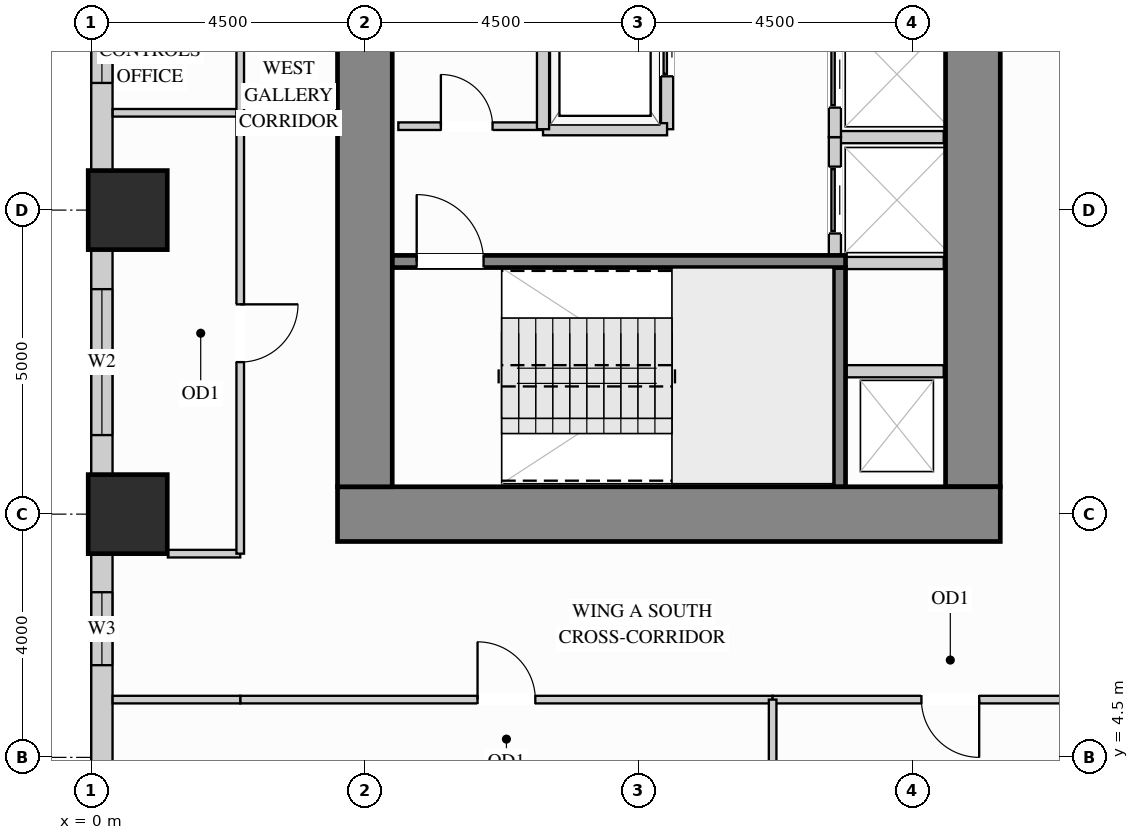
"""IFC4 building model, lengths in metres.
Left out: names, types, materials, properties, quantities, classifications, styles, units other than length and angle.
Written with IfcOpenShell. Run it as: python <this file> out.ifc"""

import sys

from ifc_helpers import new_model, si_unit, direction, frame, frame_2d, origin, origin_2d, place, context, subcontext, project, spatial, rectangle, extrude, source, transform, mapped, element, fill, save


model = new_model("IFC4")
c1 = context("Model", 3, precision=1e-05, world=origin(), true_north=direction((0.0, 1.0)))
c2 = subcontext(c1, "Body", "Model", "MODEL_VIEW")
j1 = project(units=[si_unit("LENGTHUNIT", "METRE"), si_unit("PLANEANGLEUNIT", "RADIAN")], contexts=[c1])
p1 = place(None, origin())
s1 = spatial("IfcSite", under=j1, at=p1, CompositionType="ELEMENT")
p2 = place(p1, origin())
s2 = spatial("IfcBuilding", under=s1, at=p2, CompositionType="ELEMENT")
p3 = place(p2, frame((0.0, 0.0, 26.1)))
s3 = spatial("IfcBuildingStorey", under=s2, at=p3, CompositionType="ELEMENT", Elevation=26.1)
m1 = source(origin(), c2, "Body", "SweptSolid", [
    extrude(rectangle(XDim=1.3, YDim=1.3, at=origin_2d()), origin(), (0.0, 0.0, 1.0), 3.38),
])
for number, where, z_axis, x_axis in (
    (1, (0.6, 13.5, 0.0), (0.0, 0.0, 1.0), (1.0, 0.0, 0.0)),
    (2, (0.6, 8.5, 0.0), (0.0, 0.0, 1.0), (1.0, 0.0, 0.0)),
):
    element("IfcColumn", number, at=place(p3, frame(where, z_axis=z_axis, x_axis=x_axis)), inside=s3, PredefinedType="COLUMN", context=c2, shape_type="MappedRepresentation", body=[
        mapped(m1, transform((0.0, 0.0, 0.0), x_axis=(1.0, 0.0, 0.0), y_axis=(0.0, 1.0, 0.0), z_axis=(0.0, 0.0, 1.0))),
    ])
m2 = source(origin(), c2, "Body", "SweptSolid", [
    extrude(rectangle(XDim=9.87, YDim=0.9, at=frame_2d((4.935, 0.0))), origin(), (0.0, 0.0, 1.0), 3.38),
])
p4 = place(p3, frame((14.5, 8.95, 0.0), z_axis=(0.0, 0.0, 1.0), x_axis=(0.0, 1.0, 0.0)))
e3 = element("IfcWall", 3, at=p4, inside=s3, PredefinedType="SHEAR", context=c2, shape_type="MappedRepresentation", body=[
    mapped(m2, transform((0.0, 0.0, 0.0), x_axis=(1.0, 0.0, 0.0), y_axis=(0.0, 1.0, 0.0), z_axis=(0.0, 0.0, 1.0))),
])
m3 = source(origin(), c2, "Body", "SweptSolid", [
    extrude(rectangle(XDim=10.9, YDim=0.9, at=frame_2d((5.45, 0.0))), origin(), (0.0, 0.0, 1.0), 3.38),
])
p5 = place(p3, frame((4.05, 8.5, 0.0), z_axis=(0.0, 0.0, 1.0), x_axis=(1.0, 0.0, 0.0)))
e4 = element("IfcWall", 4, at=p5, inside=s3, PredefinedType="SHEAR", context=c2, shape_type="MappedRepresentation", body=[
    mapped(m3, transform((0.0, 0.0, 0.0), x_axis=(1.0, 0.0, 0.0), y_axis=(0.0, 1.0, 0.0), z_axis=(0.0, 0.0, 1.0))),
])
m4 = source(origin(), c2, "Body", "SweptSolid", [
    extrude(rectangle(XDim=20.1, YDim=0.9, at=frame_2d((10.05, 0.0))), origin(), (0.0, 0.0, 1.0), 3.38),
])
p6 = place(p3, frame((4.5, 8.95, 0.0), z_axis=(0.0, 0.0, 1.0), x_axis=(0.0, 1.0, 0.0)))
e5 = element("IfcWall", 5, at=p6, inside=s3, PredefinedType="SHEAR", context=c2, shape_type="MappedRepresentation", body=[
    mapped(m4, transform((0.0, 0.0, 0.0), x_axis=(1.0, 0.0, 0.0), y_axis=(0.0, 1.0, 0.0), z_axis=(0.0, 0.0, 1.0))),
])
p7 = place(p3, frame((0.175, 17.352, 0.0), z_axis=(0.0, 0.0, 1.0), x_axis=(0.0, -1.0, 0.0)))
e6 = element("IfcWall", 6, at=p7, inside=s3, PredefinedType="SOLIDWALL", context=c2, shape_type="SweptSolid", body=[
    extrude(rectangle(XDim=3.204, YDim=0.35, at=frame_2d((1.602, 0.0))), origin(), (0.0, 0.0, 1.0), 2.51),
])
p8 = place(p7, frame((0.561, 0.0, 0.78)))
e7 = element("IfcOpeningElement", 7, at=p8, cuts=e6, PredefinedType="OPENING", context=c2, shape_type="SweptSolid", body=[
    extrude(rectangle(XDim=1.2, YDim=1.55, at=frame_2d((0.6, 0.775))), frame((0.0, 0.185, 0.0), z_axis=(0.0, -1.0, 0.0), x_axis=(1.0, 0.0, 0.0)), (0.0, 0.0, 1.0), 0.37),
])
p9 = place(p3, frame((0.175, 12.852, 0.0), z_axis=(0.0, 0.0, 1.0), x_axis=(0.0, -1.0, 0.0)))
e8 = element("IfcWall", 8, at=p9, inside=s3, PredefinedType="SOLIDWALL", context=c2, shape_type="SweptSolid", body=[
    extrude(rectangle(XDim=3.704, YDim=0.35, at=frame_2d((1.852, 0.0))), origin(), (0.0, 0.0, 1.0), 2.51),
])
p10 = place(p9, frame((0.652, 0.0, 0.78)))
e9 = element("IfcOpeningElement", 9, at=p10, cuts=e8, PredefinedType="OPENING", context=c2, shape_type="SweptSolid", body=[
    extrude(rectangle(XDim=2.4, YDim=1.55, at=frame_2d((1.2, 0.775))), frame((0.0, 0.185, 0.0), z_axis=(0.0, -1.0, 0.0), x_axis=(1.0, 0.0, 0.0)), (0.0, 0.0, 1.0), 0.37),
])
p11 = place(p3, frame((0.175, 7.852, 0.0), z_axis=(0.0, 0.0, 1.0), x_axis=(0.0, -1.0, 0.0)))
e10 = element("IfcWall", 10, at=p11, inside=s3, PredefinedType="SOLIDWALL", context=c2, shape_type="SweptSolid", body=[
    extrude(rectangle(XDim=3.704, YDim=0.35, at=frame_2d((1.852, 0.0))), origin(), (0.0, 0.0, 1.0), 2.51),
])
p12 = place(p11, frame((0.636, 0.0, 0.78)))
e11 = element("IfcOpeningElement", 11, at=p12, cuts=e10, PredefinedType="OPENING", context=c2, shape_type="SweptSolid", body=[
    extrude(rectangle(XDim=1.2, YDim=1.55, at=frame_2d((0.6, 0.775))), frame((0.0, 0.185, 0.0), z_axis=(0.0, -1.0, 0.0), x_axis=(1.0, 0.0, 0.0)), (0.0, 0.0, 1.0), 0.37),
])
p13 = place(p3, frame((5.05, 14.88, 0.0), z_axis=(0.0, 0.0, 1.0), x_axis=(1.0, 0.0, 0.0)))
e12 = element("IfcWall", 12, at=p13, inside=s3, PredefinedType="PARTITIONING", context=c2, shape_type="SweptSolid", body=[
    extrude(rectangle(XDim=2.35, YDim=0.125, at=frame_2d((1.175, 0.0))), origin(), (0.0, 0.0, 1.0), 3.365),
])
p14 = place(p13, frame((0.7, 0.0, 0.0)))
e13 = element("IfcOpeningElement", 13, at=p14, cuts=e12, PredefinedType="OPENING", context=c2, shape_type="SweptSolid", body=[
    extrude(rectangle(XDim=0.85, YDim=2.1, at=frame_2d((0.425, 1.05))), frame((0.0, 0.073, 0.0), z_axis=(0.0, -1.0, 0.0), x_axis=(1.0, 0.0, 0.0)), (0.0, 0.0, 1.0), 0.145),
])
m5 = source(origin(), c2, "Body", "SweptSolid", [
    extrude(rectangle(XDim=1.19, YDim=0.125, at=frame_2d((0.595, 0.0))), origin(), (0.0, 0.0, 1.0), 3.365),
])
p15 = place(p3, frame((1.26, 7.85, 0.0), z_axis=(0.0, 0.0, 1.0), x_axis=(1.0, 0.0, 0.0)))
e14 = element("IfcWall", 14, at=p15, inside=s3, PredefinedType="PARTITIONING", context=c2, shape_type="MappedRepresentation", body=[
    mapped(m5, transform((0.0, 0.0, 0.0), x_axis=(1.0, 0.0, 0.0), y_axis=(0.0, 1.0, 0.0), z_axis=(0.0, 0.0, 1.0))),
])
p16 = place(p3, frame((2.45, 5.45, 0.0), z_axis=(0.0, 0.0, 1.0), x_axis=(1.0, 0.0, 0.0)))
e15 = element("IfcWall", 15, at=p16, inside=s3, PredefinedType="PARTITIONING", context=c2, shape_type="SweptSolid", body=[
    extrude(rectangle(XDim=8.756, YDim=0.125, at=frame_2d((4.378, 0.0))), origin(), (0.0, 0.0, 1.0), 3.365),
])
p17 = place(p16, frame((3.903, 0.0, 0.0)))
e16 = element("IfcOpeningElement", 16, at=p17, cuts=e15, PredefinedType="OPENING", context=c2, shape_type="SweptSolid", body=[
    extrude(rectangle(XDim=0.95, YDim=2.15, at=frame_2d((0.475, 1.075))), frame((0.0, 0.073, 0.0), z_axis=(0.0, -1.0, 0.0), x_axis=(1.0, 0.0, 0.0)), (0.0, 0.0, 1.0), 0.145),
])
p18 = place(p3, frame((11.206, 5.45, 0.0), z_axis=(0.0, 0.0, 1.0), x_axis=(1.0, 0.0, 0.0)))
e17 = element("IfcWall", 17, at=p18, inside=s3, PredefinedType="PARTITIONING", context=c2, shape_type="SweptSolid", body=[
    extrude(rectangle(XDim=5.844, YDim=0.125, at=frame_2d((2.922, 0.0))), origin(), (0.0, 0.0, 1.0), 3.365),
])
p19 = place(p18, frame((2.447, 0.0, 0.0)))
e18 = element("IfcOpeningElement", 18, at=p19, cuts=e17, PredefinedType="OPENING", context=c2, shape_type="SweptSolid", body=[
    extrude(rectangle(XDim=0.95, YDim=2.15, at=frame_2d((0.475, 1.075))), frame((0.0, 0.073, 0.0), z_axis=(0.0, -1.0, 0.0), x_axis=(1.0, 0.0, 0.0)), (0.0, 0.0, 1.0), 0.145),
])
m6 = source(origin(), c2, "Body", "SweptSolid", [
    extrude(rectangle(XDim=2.098, YDim=0.125, at=frame_2d((1.049, 0.0))), origin(), (0.0, 0.0, 1.0), 3.365),
])
p20 = place(p3, frame((0.352, 5.45, 0.0), z_axis=(0.0, 0.0, 1.0), x_axis=(1.0, 0.0, 0.0)))
e19 = element("IfcWall", 19, at=p20, inside=s3, PredefinedType="PARTITIONING", context=c2, shape_type="MappedRepresentation", body=[
    mapped(m6, transform((0.0, 0.0, 0.0), x_axis=(1.0, 0.0, 0.0), y_axis=(0.0, 1.0, 0.0), z_axis=(0.0, 0.0, 1.0))),
])
m7 = source(origin(), c2, "Body", "SweptSolid", [
    extrude(rectangle(XDim=5.098, YDim=0.125, at=frame_2d((2.549, 0.0))), origin(), (0.0, 0.0, 1.0), 3.365),
])
p21 = place(p3, frame((11.206, 0.352, 0.0), z_axis=(0.0, 0.0, 1.0), x_axis=(0.0, 1.0, 0.0)))
e20 = element("IfcWall", 20, at=p21, inside=s3, PredefinedType="PARTITIONING", context=c2, shape_type="MappedRepresentation", body=[
    mapped(m7, transform((0.0, 0.0, 0.0), x_axis=(1.0, 0.0, 0.0), y_axis=(0.0, 1.0, 0.0), z_axis=(0.0, 0.0, 1.0))),
])
p22 = place(p3, frame((0.352, 15.1, 0.0), z_axis=(0.0, 0.0, 1.0), x_axis=(1.0, 0.0, 0.0)))
e21 = element("IfcWall", 21, at=p22, inside=s3, PredefinedType="PARTITIONING", context=c2, shape_type="MappedRepresentation", body=[
    mapped(m6, transform((0.0, 0.0, 0.0), x_axis=(1.0, 0.0, 0.0), y_axis=(0.0, 1.0, 0.0), z_axis=(0.0, 0.0, 1.0))),
])
p23 = place(p3, frame((2.45, 7.85, 0.0), z_axis=(0.0, 0.0, 1.0), x_axis=(0.0, 1.0, 0.0)))
e22 = element("IfcWall", 22, at=p23, inside=s3, PredefinedType="PARTITIONING", context=c2, shape_type="SweptSolid", body=[
    extrude(rectangle(XDim=7.25, YDim=0.125, at=frame_2d((3.625, 0.0))), origin(), (0.0, 0.0, 1.0), 3.365),
])
p24 = place(p23, frame((3.15, 0.0, 0.0)))
e23 = element("IfcOpeningElement", 23, at=p24, cuts=e22, PredefinedType="OPENING", context=c2, shape_type="SweptSolid", body=[
    extrude(rectangle(XDim=0.95, YDim=2.15, at=frame_2d((0.475, 1.075))), frame((0.0, 0.073, 0.0), z_axis=(0.0, -1.0, 0.0), x_axis=(1.0, 0.0, 0.0)), (0.0, 0.0, 1.0), 0.145),
])
p25 = place(p3, frame((2.45, 15.1, 0.0), z_axis=(0.0, 0.0, 1.0), x_axis=(0.0, 1.0, 0.0)))
e24 = element("IfcWall", 24, at=p25, inside=s3, PredefinedType="PARTITIONING", context=c2, shape_type="SweptSolid", body=[
    extrude(rectangle(XDim=7.5, YDim=0.125, at=frame_2d((3.75, 0.0))), origin(), (0.0, 0.0, 1.0), 3.365),
])
p26 = place(p25, frame((4.1, 0.0, 0.0)))
e25 = element("IfcOpeningElement", 25, at=p26, cuts=e24, PredefinedType="OPENING", context=c2, shape_type="SweptSolid", body=[
    extrude(rectangle(XDim=0.95, YDim=2.15, at=frame_2d((0.475, 1.075))), frame((0.0, 0.073, 0.0), z_axis=(0.0, -1.0, 0.0), x_axis=(1.0, 0.0, 0.0)), (0.0, 0.0, 1.0), 0.145),
])
m8 = source(origin(), c2, "Body", "SweptSolid", [
    extrude(rectangle(XDim=1.6, YDim=0.2, at=frame_2d((0.8, 0.0))), origin(), (0.0, 0.0, 1.0), 3.365),
])
p27 = place(p3, frame((12.42, 10.85, 0.0), z_axis=(0.0, 0.0, 1.0), x_axis=(1.0, 0.0, 0.0)))
e26 = element("IfcWall", 26, at=p27, inside=s3, PredefinedType="PARTITIONING", context=c2, shape_type="MappedRepresentation", body=[
    mapped(m8, transform((0.0, 0.0, 0.0), x_axis=(1.0, 0.0, 0.0), y_axis=(0.0, 1.0, 0.0), z_axis=(0.0, 0.0, 1.0))),
])
m9 = source(origin(), c2, "Body", "SweptSolid", [
    extrude(rectangle(XDim=1.79, YDim=0.2, at=frame_2d((0.895, 0.0))), origin(), (0.0, 0.0, 1.0), 3.365),
])
for number, where, z_axis, x_axis in (
    (27, (12.23, 14.7, 0.0), (0.0, 0.0, 1.0), (1.0, 0.0, 0.0)),
    (28, (12.23, 12.63, 0.0), (0.0, 0.0, 1.0), (1.0, 0.0, 0.0)),
):
    element("IfcWall", number, at=place(p3, frame(where, z_axis=z_axis, x_axis=x_axis)), inside=s3, PredefinedType="PARTITIONING", context=c2, shape_type="MappedRepresentation", body=[
        mapped(m9, transform((0.0, 0.0, 0.0), x_axis=(1.0, 0.0, 0.0), y_axis=(0.0, 1.0, 0.0), z_axis=(0.0, 0.0, 1.0))),
    ])
p28 = place(p3, frame((12.23, 12.63, 0.0), z_axis=(0.0, 0.0, 1.0), x_axis=(0.0, 1.0, 0.0)))
e29 = element("IfcWall", 29, at=p28, inside=s3, PredefinedType="PARTITIONING", context=c2, shape_type="SweptSolid", body=[
    extrude(rectangle(XDim=2.07, YDim=0.2, at=frame_2d((1.035, 0.0))), origin(), (0.0, 0.0, 1.0), 3.365),
])
p29 = place(p28, frame((0.485, 0.0, 0.0)))
e30 = element("IfcOpeningElement", 30, at=p29, cuts=e29, PredefinedType="OPENING", context=c2, shape_type="SweptSolid", body=[
    extrude(rectangle(XDim=1.1, YDim=2.2, at=frame_2d((0.55, 1.1))), frame((0.0, 0.11, 0.0), z_axis=(0.0, -1.0, 0.0), x_axis=(1.0, 0.0, 0.0)), (0.0, 0.0, 1.0), 0.22),
])
p30 = place(p3, frame((12.23, 14.7, 0.0), z_axis=(0.0, 0.0, 1.0), x_axis=(0.0, 1.0, 0.0)))
e31 = element("IfcWall", 31, at=p30, inside=s3, PredefinedType="PARTITIONING", context=c2, shape_type="SweptSolid", body=[
    extrude(rectangle(XDim=2.07, YDim=0.2, at=frame_2d((1.035, 0.0))), origin(), (0.0, 0.0, 1.0), 3.365),
])
p31 = place(p30, frame((0.485, 0.0, 0.0)))
e32 = element("IfcOpeningElement", 32, at=p31, cuts=e31, PredefinedType="OPENING", context=c2, shape_type="SweptSolid", body=[
    extrude(rectangle(XDim=1.1, YDim=2.2, at=frame_2d((0.55, 1.1))), frame((0.0, 0.11, 0.0), z_axis=(0.0, -1.0, 0.0), x_axis=(1.0, 0.0, 0.0)), (0.0, 0.0, 1.0), 0.22),
])
p32 = place(p3, frame((9.47, 14.83, 0.0), z_axis=(0.0, 0.0, 1.0), x_axis=(0.0, 1.0, 0.0)))
e33 = element("IfcWall", 33, at=p32, inside=s3, PredefinedType="PARTITIONING", context=c2, shape_type="SweptSolid", body=[
    extrude(rectangle(XDim=2.84, YDim=0.2, at=frame_2d((1.42, 0.0))), origin(), (0.0, 0.0, 1.0), 3.365),
])
p33 = place(p32, frame((0.87, 0.0, 0.0)))
e34 = element("IfcOpeningElement", 34, at=p33, cuts=e33, PredefinedType="OPENING", context=c2, shape_type="SweptSolid", body=[
    extrude(rectangle(XDim=1.1, YDim=2.2, at=frame_2d((0.55, 1.1))), frame((0.0, 0.11, 0.0), z_axis=(0.0, -1.0, 0.0), x_axis=(1.0, 0.0, 0.0)), (0.0, 0.0, 1.0), 0.22),
])
m10 = source(origin(), c2, "Body", "SweptSolid", [
    extrude(rectangle(XDim=2.04, YDim=0.2, at=frame_2d((1.02, 0.0))), origin(), (0.0, 0.0, 1.0), 3.365),
])
p34 = place(p3, frame((7.43, 14.83, 0.0), z_axis=(0.0, 0.0, 1.0), x_axis=(1.0, 0.0, 0.0)))
e35 = element("IfcWall", 35, at=p34, inside=s3, PredefinedType="PARTITIONING", context=c2, shape_type="MappedRepresentation", body=[
    mapped(m10, transform((0.0, 0.0, 0.0), x_axis=(1.0, 0.0, 0.0), y_axis=(0.0, 1.0, 0.0), z_axis=(0.0, 0.0, 1.0))),
])
m11 = source(origin(), c2, "Body", "SweptSolid", [
    extrude(rectangle(XDim=2.84, YDim=0.2, at=frame_2d((1.42, 0.0))), origin(), (0.0, 0.0, 1.0), 3.365),
])
p35 = place(p3, frame((7.43, 14.83, 0.0), z_axis=(0.0, 0.0, 1.0), x_axis=(0.0, 1.0, 0.0)))
e36 = element("IfcWall", 36, at=p35, inside=s3, PredefinedType="PARTITIONING", context=c2, shape_type="MappedRepresentation", body=[
    mapped(m11, transform((0.0, 0.0, 0.0), x_axis=(1.0, 0.0, 0.0), y_axis=(0.0, 1.0, 0.0), z_axis=(0.0, 0.0, 1.0))),
])
m12 = source(origin(), c2, "Body", "SweptSolid", [
    extrude(rectangle(XDim=3.603, YDim=0.2, at=frame_2d((1.802, 0.0))), origin(), (0.0, 0.0, 1.0), 3.38),
])
p36 = place(p3, frame((12.305, 8.952, 0.0), z_axis=(0.0, 0.0, 1.0), x_axis=(0.0, 1.0, 0.0)))
e37 = element("IfcWall", 37, at=p36, inside=s3, PredefinedType="SHEAR", context=c2, shape_type="MappedRepresentation", body=[
    mapped(m12, transform((0.0, 0.0, 0.0), x_axis=(1.0, 0.0, 0.0), y_axis=(0.0, 1.0, 0.0), z_axis=(0.0, 0.0, 1.0))),
])
p37 = place(p3, frame((4.952, 12.655, 0.0), z_axis=(0.0, 0.0, 1.0), x_axis=(1.0, 0.0, 0.0)))
e38 = element("IfcWall", 38, at=p37, inside=s3, PredefinedType="SHEAR", context=c2, shape_type="SweptSolid", body=[
    extrude(rectangle(XDim=7.453, YDim=0.2, at=frame_2d((3.727, 0.0))), origin(), (0.0, 0.0, 1.0), 3.38),
])
p38 = place(p37, frame((0.4, 0.0, 0.0)))
e39 = element("IfcOpeningElement", 39, at=p38, cuts=e38, PredefinedType="OPENING", context=c2, shape_type="SweptSolid", body=[
    extrude(rectangle(XDim=1.1, YDim=2.15, at=frame_2d((0.55, 1.075))), frame((0.0, 0.11, 0.0), z_axis=(0.0, -1.0, 0.0), x_axis=(1.0, 0.0, 0.0)), (0.0, 0.0, 1.0), 0.22),
])
m13 = source(origin(), c2, "Body", "SweptSolid", [
    extrude(rectangle(XDim=1.1, YDim=2.2, at=frame_2d((0.55, 1.1))), frame((0.0, 0.025, 0.0), z_axis=(0.0, -1.0, 0.0), x_axis=(1.0, 0.0, 0.0)), (0.0, 0.0, 1.0), 0.05),
])
p39 = place(p29, origin())
e40 = element("IfcDoor", 40, at=p39, inside=s3, OperationType="SLIDING_TO_LEFT", PredefinedType="DOOR", context=c2, shape_type="MappedRepresentation", body=[
    mapped(m13, transform((0.0, 0.0, 0.0), x_axis=(1.0, 0.0, 0.0), y_axis=(0.0, 1.0, 0.0), z_axis=(0.0, 0.0, 1.0))),
])
fill(e30, e40)
p40 = place(p31, origin())
e41 = element("IfcDoor", 41, at=p40, inside=s3, OperationType="SLIDING_TO_LEFT", PredefinedType="DOOR", context=c2, shape_type="MappedRepresentation", body=[
    mapped(m13, transform((0.0, 0.0, 0.0), x_axis=(1.0, 0.0, 0.0), y_axis=(0.0, 1.0, 0.0), z_axis=(0.0, 0.0, 1.0))),
])
fill(e32, e41)
p41 = place(p33, origin())
e42 = element("IfcDoor", 42, at=p41, inside=s3, OperationType="SLIDING_TO_LEFT", PredefinedType="DOOR", context=c2, shape_type="MappedRepresentation", body=[
    mapped(m13, transform((0.0, 0.0, 0.0), x_axis=(1.0, 0.0, 0.0), y_axis=(0.0, 1.0, 0.0), z_axis=(0.0, 0.0, 1.0))),
])
fill(e34, e42)
m14 = source(origin(), c2, "Body", "SweptSolid", [
    extrude(rectangle(XDim=0.95, YDim=2.15, at=frame_2d((0.475, 1.075))), frame((0.0, 0.025, 0.0), z_axis=(0.0, -1.0, 0.0), x_axis=(1.0, 0.0, 0.0)), (0.0, 0.0, 1.0), 0.05),
])
p42 = place(p17, origin())
e43 = element("IfcDoor", 43, at=p42, inside=s3, OperationType="SINGLE_SWING_LEFT", PredefinedType="DOOR", context=c2, shape_type="MappedRepresentation", body=[
    mapped(m14, transform((0.0, 0.0, 0.0), x_axis=(1.0, 0.0, 0.0), y_axis=(0.0, 1.0, 0.0), z_axis=(0.0, 0.0, 1.0))),
])
fill(e16, e43)
p43 = place(p19, origin())
e44 = element("IfcDoor", 44, at=p43, inside=s3, OperationType="SINGLE_SWING_RIGHT", PredefinedType="DOOR", context=c2, shape_type="MappedRepresentation", body=[
    mapped(m14, transform((0.0, 0.0, 0.0), x_axis=(1.0, 0.0, 0.0), y_axis=(0.0, 1.0, 0.0), z_axis=(0.0, 0.0, 1.0))),
])
fill(e18, e44)
p44 = place(p24, origin())
e45 = element("IfcDoor", 45, at=p44, inside=s3, OperationType="SINGLE_SWING_RIGHT", PredefinedType="DOOR", context=c2, shape_type="MappedRepresentation", body=[
    mapped(m14, transform((0.0, 0.0, 0.0), x_axis=(1.0, 0.0, 0.0), y_axis=(0.0, 1.0, 0.0), z_axis=(0.0, 0.0, 1.0))),
])
fill(e23, e45)
m15 = source(origin(), c2, "Body", "SweptSolid", [
    extrude(rectangle(XDim=0.85, YDim=2.1, at=frame_2d((0.425, 1.05))), frame((0.0, 0.025, 0.0), z_axis=(0.0, -1.0, 0.0), x_axis=(1.0, 0.0, 0.0)), (0.0, 0.0, 1.0), 0.05),
])
p45 = place(p14, origin())
e46 = element("IfcDoor", 46, at=p45, inside=s3, OperationType="SINGLE_SWING_LEFT", PredefinedType="DOOR", context=c2, shape_type="MappedRepresentation", body=[
    mapped(m15, transform((0.0, 0.0, 0.0), x_axis=(1.0, 0.0, 0.0), y_axis=(0.0, 1.0, 0.0), z_axis=(0.0, 0.0, 1.0))),
])
fill(e13, e46)
m16 = source(origin(), c2, "Body", "SweptSolid", [
    extrude(rectangle(XDim=1.1, YDim=2.15, at=frame_2d((0.55, 1.075))), frame((0.0, 0.025, 0.0), z_axis=(0.0, -1.0, 0.0), x_axis=(1.0, 0.0, 0.0)), (0.0, 0.0, 1.0), 0.05),
])
p46 = place(p38, origin())
e47 = element("IfcDoor", 47, at=p46, inside=s3, OperationType="SINGLE_SWING_LEFT", PredefinedType="DOOR", context=c2, shape_type="MappedRepresentation", body=[
    mapped(m16, transform((0.0, 0.0, 0.0), x_axis=(1.0, 0.0, 0.0), y_axis=(0.0, 1.0, 0.0), z_axis=(0.0, 0.0, 1.0))),
])
fill(e39, e47)
m17 = source(origin(), c2, "Body", "SweptSolid", [
    extrude(rectangle(XDim=2.4, YDim=1.55, at=frame_2d((1.2, 0.775))), frame((0.0, 0.03, 0.0), z_axis=(0.0, -1.0, 0.0), x_axis=(1.0, 0.0, 0.0)), (0.0, 0.0, 1.0), 0.06),
])
p47 = place(p10, origin())
e48 = element("IfcWindow", 48, at=p47, inside=s3, PartitioningType="SINGLE_PANEL", PredefinedType="WINDOW", context=c2, shape_type="MappedRepresentation", body=[
    mapped(m17, transform((0.0, 0.0, 0.0), x_axis=(1.0, 0.0, 0.0), y_axis=(0.0, 1.0, 0.0), z_axis=(0.0, 0.0, 1.0))),
])
fill(e9, e48)
m18 = source(origin(), c2, "Body", "SweptSolid", [
    extrude(rectangle(XDim=1.2, YDim=1.55, at=frame_2d((0.6, 0.775))), frame((0.0, 0.03, 0.0), z_axis=(0.0, -1.0, 0.0), x_axis=(1.0, 0.0, 0.0)), (0.0, 0.0, 1.0), 0.06),
])
p48 = place(p8, origin())
e49 = element("IfcWindow", 49, at=p48, inside=s3, PartitioningType="SINGLE_PANEL", PredefinedType="WINDOW", context=c2, shape_type="MappedRepresentation", body=[
    mapped(m18, transform((0.0, 0.0, 0.0), x_axis=(1.0, 0.0, 0.0), y_axis=(0.0, 1.0, 0.0), z_axis=(0.0, 0.0, 1.0))),
])
fill(e7, e49)
p49 = place(p12, origin())
e50 = element("IfcWindow", 50, at=p49, inside=s3, PartitioningType="SINGLE_PANEL", PredefinedType="WINDOW", context=c2, shape_type="MappedRepresentation", body=[
    mapped(m18, transform((0.0, 0.0, 0.0), x_axis=(1.0, 0.0, 0.0), y_axis=(0.0, 1.0, 0.0), z_axis=(0.0, 0.0, 1.0))),
])
fill(e11, e50)
save(model, sys.argv[1])
